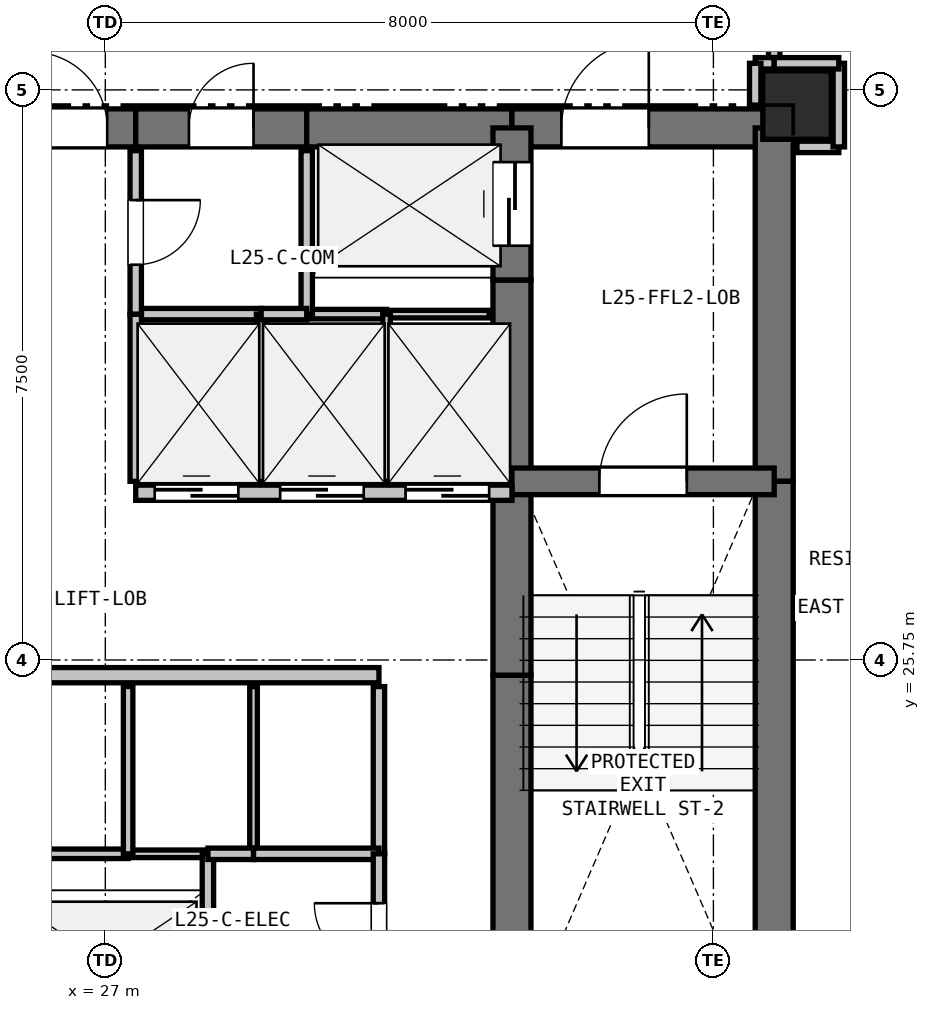
"""IFC4 building model, lengths in metres.
Left out: names, types, materials, properties, quantities, classifications, styles, units other than length and angle.
Written with IfcOpenShell. Run it as: python <this file> out.ifc"""

import sys

from ifc_helpers import new_model, si_unit, direction, frame, frame_2d, origin, origin_2d, place, context, subcontext, project, spatial, rectangle, extrude, element, fill, save


model = new_model("IFC4")
c1 = context("Model", 3, precision=1e-05, world=origin(), true_north=direction((0.0, 1.0)))
c2 = subcontext(c1, "Body", "Model", "MODEL_VIEW")
j1 = project(units=[si_unit("LENGTHUNIT", "METRE"), si_unit("PLANEANGLEUNIT", "RADIAN")], contexts=[c1])
p1 = place(None, origin())
s1 = spatial("IfcSite", under=j1, at=p1, CompositionType="ELEMENT")
p2 = place(p1, origin())
s2 = spatial("IfcBuilding", under=s1, at=p2, CompositionType="ELEMENT")
p3 = place(p2, frame((0.0, 0.0, 93.3)))
s3 = spatial("IfcBuildingStorey", under=s2, at=p3, CompositionType="ELEMENT", Elevation=93.3)
p4 = place(p3, frame((36.1, 33.05, 0.0), z_axis=(0.0, 0.0, 1.0), x_axis=(1.0, 0.0, 0.0)))
e1 = element("IfcColumn", 1, at=p4, inside=s3, PredefinedType="COLUMN", context=c2, shape_type="SweptSolid", body=[
    extrude(rectangle(XDim=0.9, YDim=0.9, at=origin_2d()), origin(), (0.0, 0.0, 1.0), 3.3),
])
p5 = place(p3, frame((25.65, 32.75, 0.0), z_axis=(0.0, 0.0, 1.0), x_axis=(1.0, 0.0, 0.0)))
e2 = element("IfcWall", 2, at=p5, inside=s3, PredefinedType="SHEAR", context=c2, shape_type="SweptSolid", body=[
    extrude(rectangle(XDim=1.75, YDim=0.5, at=frame_2d((0.875, 0.0))), origin(), (0.0, 0.0, 1.0), 3.05),
])
p6 = place(p5, frame((0.375, 0.0, 0.0)))
e3 = element("IfcOpeningElement", 3, at=p6, cuts=e2, PredefinedType="OPENING", context=c2, shape_type="SweptSolid", body=[
    extrude(rectangle(XDim=1.0, YDim=2.15, at=frame_2d((0.5, 1.075))), frame((0.0, 0.26, 0.0), z_axis=(0.0, -1.0, 0.0), x_axis=(1.0, 0.0, 0.0)), (0.0, 0.0, 1.0), 0.52),
])
p7 = place(p3, frame((27.4, 32.75, 0.0), z_axis=(0.0, 0.0, 1.0), x_axis=(1.0, 0.0, 0.0)))
e4 = element("IfcWall", 4, at=p7, inside=s3, PredefinedType="SHEAR", context=c2, shape_type="SweptSolid", body=[
    extrude(rectangle(XDim=2.25, YDim=0.5, at=frame_2d((1.125, 0.0))), origin(), (0.0, 0.0, 1.0), 3.05),
])
p8 = place(p7, frame((0.7, 0.0, 0.0)))
e5 = element("IfcOpeningElement", 5, at=p8, cuts=e4, PredefinedType="OPENING", context=c2, shape_type="SweptSolid", body=[
    extrude(rectangle(XDim=0.85, YDim=2.1, at=frame_2d((0.425, 1.05))), frame((0.0, 0.26, 0.0), z_axis=(0.0, -1.0, 0.0), x_axis=(1.0, 0.0, 0.0)), (0.0, 0.0, 1.0), 0.52),
])
p9 = place(p3, frame((29.65, 32.75, 0.0), z_axis=(0.0, 0.0, 1.0), x_axis=(1.0, 0.0, 0.0)))
e6 = element("IfcWall", 6, at=p9, inside=s3, PredefinedType="SHEAR", context=c2, shape_type="SweptSolid", body=[
    extrude(rectangle(XDim=2.7, YDim=0.5, at=frame_2d((1.35, 0.0))), origin(), (0.0, 0.0, 1.0), 3.05),
])
p10 = place(p3, frame((32.35, 32.75, 0.0), z_axis=(0.0, 0.0, 1.0), x_axis=(1.0, 0.0, 0.0)))
e7 = element("IfcWall", 7, at=p10, inside=s3, PredefinedType="SHEAR", context=c2, shape_type="SweptSolid", body=[
    extrude(rectangle(XDim=3.45, YDim=0.5, at=frame_2d((1.725, 0.0))), origin(), (0.0, 0.0, 1.0), 3.05),
])
p11 = place(p10, frame((0.65, 0.0, 0.0)))
e8 = element("IfcOpeningElement", 8, at=p11, cuts=e7, PredefinedType="OPENING", context=c2, shape_type="SweptSolid", body=[
    extrude(rectangle(XDim=1.15, YDim=2.15, at=frame_2d((0.575, 1.075))), frame((0.0, 0.26, 0.0), z_axis=(0.0, -1.0, 0.0), x_axis=(1.0, 0.0, 0.0)), (0.0, 0.0, 1.0), 0.52),
])
p12 = place(p3, frame((35.8, 32.75, 0.0), z_axis=(0.0, 0.0, 1.0), x_axis=(0.0, -1.0, 0.0)))
e9 = element("IfcWall", 9, at=p12, inside=s3, PredefinedType="SHEAR", context=c2, shape_type="SweptSolid", body=[
    extrude(rectangle(XDim=4.65, YDim=0.5, at=frame_2d((2.325, 0.0))), origin(), (0.0, 0.0, 1.0), 3.05),
])
p13 = place(p3, frame((35.8, 28.1, 0.0), z_axis=(0.0, 0.0, 1.0), x_axis=(0.0, -1.0, 0.0)))
e10 = element("IfcWall", 10, at=p13, inside=s3, PredefinedType="SHEAR", context=c2, shape_type="SweptSolid", body=[
    extrude(rectangle(XDim=7.35, YDim=0.5, at=frame_2d((3.675, 0.0))), origin(), (0.0, 0.0, 1.0), 3.05),
])
p14 = place(p3, frame((32.35, 20.75, 0.0), z_axis=(0.0, 0.0, 1.0), x_axis=(0.0, 1.0, 0.0)))
e11 = element("IfcWall", 11, at=p14, inside=s3, PredefinedType="SHEAR", context=c2, shape_type="SweptSolid", body=[
    extrude(rectangle(XDim=4.8, YDim=0.5, at=frame_2d((2.4, 0.0))), origin(), (0.0, 0.0, 1.0), 3.05),
])
p15 = place(p3, frame((32.35, 25.55, 0.0), z_axis=(0.0, 0.0, 1.0), x_axis=(0.0, 1.0, 0.0)))
e12 = element("IfcWall", 12, at=p15, inside=s3, PredefinedType="SHEAR", context=c2, shape_type="SweptSolid", body=[
    extrude(rectangle(XDim=2.4, YDim=0.5, at=frame_2d((1.2, 0.0))), origin(), (0.0, 0.0, 1.0), 3.05),
])
p16 = place(p3, frame((32.35, 27.95, 0.0), z_axis=(0.0, 0.0, 1.0), x_axis=(0.0, 1.0, 0.0)))
e13 = element("IfcWall", 13, at=p16, inside=s3, PredefinedType="SHEAR", context=c2, shape_type="SweptSolid", body=[
    extrude(rectangle(XDim=2.8, YDim=0.5, at=frame_2d((1.4, 0.0))), origin(), (0.0, 0.0, 1.0), 3.05),
])
p17 = place(p3, frame((32.35, 30.75, 0.0), z_axis=(0.0, 0.0, 1.0), x_axis=(0.0, 1.0, 0.0)))
e14 = element("IfcWall", 14, at=p17, inside=s3, PredefinedType="SHEAR", context=c2, shape_type="SweptSolid", body=[
    extrude(rectangle(XDim=2.0, YDim=0.5, at=frame_2d((1.0, 0.0))), origin(), (0.0, 0.0, 1.0), 3.05),
])
p18 = place(p17, frame((0.45, 0.0, 0.0)))
e15 = element("IfcOpeningElement", 15, at=p18, cuts=e14, PredefinedType="OPENING", context=c2, shape_type="SweptSolid", body=[
    extrude(rectangle(XDim=1.1, YDim=2.15, at=frame_2d((0.55, 1.075))), frame((0.0, 0.26, 0.0), z_axis=(0.0, -1.0, 0.0), x_axis=(1.0, 0.0, 0.0)), (0.0, 0.0, 1.0), 0.52),
])
p19 = place(p3, frame((32.35, 28.1, 0.0), z_axis=(0.0, 0.0, 1.0), x_axis=(1.0, 0.0, 0.0)))
e16 = element("IfcWall", 16, at=p19, inside=s3, PredefinedType="SHEAR", context=c2, shape_type="SweptSolid", body=[
    extrude(rectangle(XDim=3.45, YDim=0.35, at=frame_2d((1.725, 0.0))), origin(), (0.0, 0.0, 1.0), 3.05),
])
p20 = place(p19, frame((1.15, 0.0, 0.0)))
e17 = element("IfcOpeningElement", 17, at=p20, cuts=e16, PredefinedType="OPENING", context=c2, shape_type="SweptSolid", body=[
    extrude(rectangle(XDim=1.15, YDim=2.15, at=frame_2d((0.575, 1.075))), frame((0.0, 0.185, 0.0), z_axis=(0.0, -1.0, 0.0), x_axis=(1.0, 0.0, 0.0)), (0.0, 0.0, 1.0), 0.37),
])
p21 = place(p3, frame((25.65, 25.55, 0.0), z_axis=(0.0, 0.0, 1.0), x_axis=(1.0, 0.0, 0.0)))
e18 = element("IfcWall", 18, at=p21, inside=s3, PredefinedType="PARTITIONING", context=c2, shape_type="SweptSolid", body=[
    extrude(rectangle(XDim=4.95, YDim=0.2, at=frame_2d((2.475, 0.0))), origin(), (0.0, 0.0, 1.0), 3.05),
])
p22 = place(p3, frame((27.4, 27.95, 0.0), z_axis=(0.0, 0.0, 1.0), x_axis=(1.0, 0.0, 0.0)))
e19 = element("IfcWall", 19, at=p22, inside=s3, PredefinedType="PARTITIONING", context=c2, shape_type="SweptSolid", body=[
    extrude(rectangle(XDim=4.95, YDim=0.2, at=frame_2d((2.475, 0.0))), origin(), (0.0, 0.0, 1.0), 3.05),
])
p23 = place(p22, frame((0.25, 0.0, 0.0)))
e20 = element("IfcOpeningElement", 20, at=p23, cuts=e19, PredefinedType="OPENING", context=c2, shape_type="SweptSolid", body=[
    extrude(rectangle(XDim=1.1, YDim=2.15, at=frame_2d((0.55, 1.075))), frame((0.0, 0.11, 0.0), z_axis=(0.0, -1.0, 0.0), x_axis=(1.0, 0.0, 0.0)), (0.0, 0.0, 1.0), 0.22),
])
p24 = place(p22, frame((1.9, 0.0, 0.0)))
e21 = element("IfcOpeningElement", 21, at=p24, cuts=e19, PredefinedType="OPENING", context=c2, shape_type="SweptSolid", body=[
    extrude(rectangle(XDim=1.1, YDim=2.15, at=frame_2d((0.55, 1.075))), frame((0.0, 0.11, 0.0), z_axis=(0.0, -1.0, 0.0), x_axis=(1.0, 0.0, 0.0)), (0.0, 0.0, 1.0), 0.22),
])
p25 = place(p22, frame((3.55, 0.0, 0.0)))
e22 = element("IfcOpeningElement", 22, at=p25, cuts=e19, PredefinedType="OPENING", context=c2, shape_type="SweptSolid", body=[
    extrude(rectangle(XDim=1.1, YDim=2.15, at=frame_2d((0.55, 1.075))), frame((0.0, 0.11, 0.0), z_axis=(0.0, -1.0, 0.0), x_axis=(1.0, 0.0, 0.0)), (0.0, 0.0, 1.0), 0.22),
])
p26 = place(p3, frame((25.95, 23.2, 0.0), z_axis=(0.0, 0.0, 1.0), x_axis=(1.0, 0.0, 0.0)))
e23 = element("IfcWall", 23, at=p26, inside=s3, PredefinedType="PARTITIONING", context=c2, shape_type="SweptSolid", body=[
    extrude(rectangle(XDim=1.35, YDim=0.125, at=frame_2d((0.675, 0.0))), origin(), (0.0, 0.0, 1.0), 3.05),
])
p27 = place(p3, frame((27.3, 23.2, 0.0), z_axis=(0.0, 0.0, 1.0), x_axis=(1.0, 0.0, 0.0)))
e24 = element("IfcWall", 24, at=p27, inside=s3, PredefinedType="PARTITIONING", context=c2, shape_type="SweptSolid", body=[
    extrude(rectangle(XDim=1.05, YDim=0.1, at=frame_2d((0.525, 0.0))), origin(), (0.0, 0.0, 1.0), 3.05),
])
p28 = place(p3, frame((28.35, 23.2, 0.0), z_axis=(0.0, 0.0, 1.0), x_axis=(0.0, -1.0, 0.0)))
e25 = element("IfcWall", 25, at=p28, inside=s3, PredefinedType="PARTITIONING", context=c2, shape_type="SweptSolid", body=[
    extrude(rectangle(XDim=2.15, YDim=0.15, at=frame_2d((1.075, 0.0))), origin(), (0.0, 0.0, 1.0), 3.05),
])
p29 = place(p3, frame((32.05, 30.3, 0.0), z_axis=(0.0, 0.0, 1.0), x_axis=(-1.0, 0.0, 0.0)))
e26 = element("IfcWall", 26, at=p29, inside=s3, PredefinedType="PARTITIONING", context=c2, shape_type="SweptSolid", body=[
    extrude(rectangle(XDim=1.35, YDim=0.1, at=frame_2d((0.675, 0.0))), origin(), (0.0, 0.0, 1.0), 3.05),
])
p30 = place(p3, frame((30.7, 30.3, 0.0), z_axis=(0.0, 0.0, 1.0), x_axis=(-1.0, 0.0, 0.0)))
e27 = element("IfcWall", 27, at=p30, inside=s3, PredefinedType="PARTITIONING", context=c2, shape_type="SweptSolid", body=[
    extrude(rectangle(XDim=1.05, YDim=0.125, at=frame_2d((0.525, 0.0))), origin(), (0.0, 0.0, 1.0), 3.05),
])
p31 = place(p3, frame((29.65, 30.3, 0.0), z_axis=(0.0, 0.0, 1.0), x_axis=(0.0, 1.0, 0.0)))
e28 = element("IfcWall", 28, at=p31, inside=s3, PredefinedType="PARTITIONING", context=c2, shape_type="SweptSolid", body=[
    extrude(rectangle(XDim=2.15, YDim=0.15, at=frame_2d((1.075, 0.0))), origin(), (0.0, 0.0, 1.0), 3.05),
])
p32 = place(p3, frame((27.3, 25.4, 0.0), z_axis=(0.0, 0.0, 1.0), x_axis=(0.0, -1.0, 0.0)))
e29 = element("IfcWall", 29, at=p32, inside=s3, PredefinedType="PARTITIONING", context=c2, shape_type="SweptSolid", body=[
    extrude(rectangle(XDim=2.2, YDim=0.125, at=frame_2d((1.1, 0.0))), origin(), (0.0, 0.0, 1.0), 3.05),
])
p33 = place(p3, frame((28.95, 25.4, 0.0), z_axis=(0.0, 0.0, 1.0), x_axis=(0.0, -1.0, 0.0)))
e30 = element("IfcWall", 30, at=p33, inside=s3, PredefinedType="PARTITIONING", context=c2, shape_type="SweptSolid", body=[
    extrude(rectangle(XDim=2.2, YDim=0.1, at=frame_2d((1.1, 0.0))), origin(), (0.0, 0.0, 1.0), 3.05),
])
p34 = place(p3, frame((28.95, 23.2, 0.0), z_axis=(0.0, 0.0, 1.0), x_axis=(-1.0, 0.0, 0.0)))
e31 = element("IfcWall", 31, at=p34, inside=s3, PredefinedType="PARTITIONING", context=c2, shape_type="SweptSolid", body=[
    extrude(rectangle(XDim=0.6, YDim=0.15, at=frame_2d((0.3, 0.0))), origin(), (0.0, 0.0, 1.0), 3.05),
])
p35 = place(p3, frame((30.6, 25.4, 0.0), z_axis=(0.0, 0.0, 1.0), x_axis=(0.0, -1.0, 0.0)))
e32 = element("IfcWall", 32, at=p35, inside=s3, PredefinedType="PARTITIONING", context=c2, shape_type="SweptSolid", body=[
    extrude(rectangle(XDim=2.2, YDim=0.15, at=frame_2d((1.1, 0.0))), origin(), (0.0, 0.0, 1.0), 3.05),
])
for number, where, z_axis, x_axis in (
    (33, (30.6, 23.2, 0.0), (0.0, 0.0, 1.0), (-1.0, 0.0, 0.0)),
    (34, (27.4, 30.3, 0.0), (0.0, 0.0, 1.0), (1.0, 0.0, 0.0)),
):
    element("IfcWall", number, at=place(p3, frame(where, z_axis=z_axis, x_axis=x_axis)), inside=s3, PredefinedType="PARTITIONING", context=c2, shape_type="SweptSolid", body=[
        extrude(rectangle(XDim=1.65, YDim=0.15, at=frame_2d((0.825, 0.0))), origin(), (0.0, 0.0, 1.0), 3.05),
    ])
p36 = place(p3, frame((29.05, 30.3, 0.0), z_axis=(0.0, 0.0, 1.0), x_axis=(0.0, -1.0, 0.0)))
e35 = element("IfcWall", 35, at=p36, inside=s3, PredefinedType="PARTITIONING", context=c2, shape_type="SweptSolid", body=[
    extrude(rectangle(XDim=2.2, YDim=0.125, at=frame_2d((1.1, 0.0))), origin(), (0.0, 0.0, 1.0), 3.05),
])
p37 = place(p3, frame((27.4, 28.1, 0.0), z_axis=(0.0, 0.0, 1.0), x_axis=(0.0, 1.0, 0.0)))
e36 = element("IfcWall", 36, at=p37, inside=s3, PredefinedType="PARTITIONING", context=c2, shape_type="SweptSolid", body=[
    extrude(rectangle(XDim=2.2, YDim=0.15, at=frame_2d((1.1, 0.0))), origin(), (0.0, 0.0, 1.0), 3.05),
])
p38 = place(p3, frame((29.05, 30.3, 0.0), z_axis=(0.0, 0.0, 1.0), x_axis=(1.0, 0.0, 0.0)))
e37 = element("IfcWall", 37, at=p38, inside=s3, PredefinedType="PARTITIONING", context=c2, shape_type="SweptSolid", body=[
    extrude(rectangle(XDim=0.6, YDim=0.15, at=frame_2d((0.3, 0.0))), origin(), (0.0, 0.0, 1.0), 3.05),
])
p39 = place(p3, frame((30.7, 30.3, 0.0), z_axis=(0.0, 0.0, 1.0), x_axis=(0.0, -1.0, 0.0)))
e38 = element("IfcWall", 38, at=p39, inside=s3, PredefinedType="PARTITIONING", context=c2, shape_type="SweptSolid", body=[
    extrude(rectangle(XDim=2.2, YDim=0.1, at=frame_2d((1.1, 0.0))), origin(), (0.0, 0.0, 1.0), 3.05),
])
p40 = place(p3, frame((30.6, 21.05, 0.0), z_axis=(0.0, 0.0, 1.0), x_axis=(0.0, 1.0, 0.0)))
e39 = element("IfcWall", 39, at=p40, inside=s3, PredefinedType="PARTITIONING", context=c2, shape_type="SweptSolid", body=[
    extrude(rectangle(XDim=2.15, YDim=0.15, at=frame_2d((1.075, 0.0))), origin(), (0.0, 0.0, 1.0), 3.05),
])
p41 = place(p40, frame((0.65, 0.0, 0.0)))
e40 = element("IfcOpeningElement", 40, at=p41, cuts=e39, PredefinedType="OPENING", context=c2, shape_type="SweptSolid", body=[
    extrude(rectangle(XDim=0.85, YDim=2.1, at=frame_2d((0.425, 1.05))), frame((0.0, 0.085, 0.0), z_axis=(0.0, -1.0, 0.0), x_axis=(1.0, 0.0, 0.0)), (0.0, 0.0, 1.0), 0.17),
])
p42 = place(p3, frame((27.4, 32.45, 0.0), z_axis=(0.0, 0.0, 1.0), x_axis=(0.0, -1.0, 0.0)))
e41 = element("IfcWall", 41, at=p42, inside=s3, PredefinedType="PARTITIONING", context=c2, shape_type="SweptSolid", body=[
    extrude(rectangle(XDim=2.15, YDim=0.15, at=frame_2d((1.075, 0.0))), origin(), (0.0, 0.0, 1.0), 3.05),
])
p43 = place(p42, frame((0.65, 0.0, 0.0)))
e42 = element("IfcOpeningElement", 42, at=p43, cuts=e41, PredefinedType="OPENING", context=c2, shape_type="SweptSolid", body=[
    extrude(rectangle(XDim=0.85, YDim=2.1, at=frame_2d((0.425, 1.05))), frame((0.0, 0.085, 0.0), z_axis=(0.0, -1.0, 0.0), x_axis=(1.0, 0.0, 0.0)), (0.0, 0.0, 1.0), 0.17),
])
p44 = place(p3, frame((35.8, 35.35, 0.0), z_axis=(0.0, 0.0, 1.0), x_axis=(0.0, -1.0, 0.0)))
e43 = element("IfcWall", 43, at=p44, inside=s3, PredefinedType="PARTITIONING", context=c2, shape_type="SweptSolid", body=[
    extrude(rectangle(XDim=1.75, YDim=0.15, at=frame_2d((0.875, 0.0))), origin(), (0.0, 0.0, 1.0), 3.05),
])
p45 = place(p44, frame((0.375, 0.0, 0.0)))
e44 = element("IfcOpeningElement", 44, at=p45, cuts=e43, PredefinedType="OPENING", context=c2, shape_type="SweptSolid", body=[
    extrude(rectangle(XDim=1.0, YDim=2.15, at=frame_2d((0.5, 1.075))), frame((0.0, 0.085, 0.0), z_axis=(0.0, -1.0, 0.0), x_axis=(1.0, 0.0, 0.0)), (0.0, 0.0, 1.0), 0.17),
])
p46 = place(p3, frame((35.8, 33.6, 0.0), z_axis=(0.0, 0.0, 1.0), x_axis=(-1.0, 0.0, 0.0)))
e45 = element("IfcWall", 45, at=p46, inside=s3, PredefinedType="PARTITIONING", context=c2, shape_type="SweptSolid", body=[
    extrude(rectangle(XDim=0.25, YDim=0.15, at=frame_2d((0.125, 0.0))), origin(), (0.0, 0.0, 1.0), 3.05),
])
p47 = place(p3, frame((35.55, 33.6, 0.0), z_axis=(0.0, 0.0, 1.0), x_axis=(0.0, -1.0, 0.0)))
e46 = element("IfcWall", 46, at=p47, inside=s3, PredefinedType="PARTITIONING", context=c2, shape_type="SweptSolid", body=[
    extrude(rectangle(XDim=0.55, YDim=0.15, at=frame_2d((0.275, 0.0))), origin(), (0.0, 0.0, 1.0), 2.498),
])
p48 = place(p3, frame((36.1, 32.5, 0.0), z_axis=(0.0, 0.0, 1.0), x_axis=(1.0, 0.0, 0.0)))
e47 = element("IfcWall", 47, at=p48, inside=s3, PredefinedType="PARTITIONING", context=c2, shape_type="SweptSolid", body=[
    extrude(rectangle(XDim=0.55, YDim=0.15, at=frame_2d((0.275, 0.0))), origin(), (0.0, 0.0, 1.0), 2.498),
])
p49 = place(p3, frame((36.65, 32.5, 0.0), z_axis=(0.0, 0.0, 1.0), x_axis=(0.0, 1.0, 0.0)))
e48 = element("IfcWall", 48, at=p49, inside=s3, PredefinedType="PARTITIONING", context=c2, shape_type="SweptSolid", body=[
    extrude(rectangle(XDim=1.1, YDim=0.15, at=frame_2d((0.55, 0.0))), origin(), (0.0, 0.0, 1.0), 2.423),
])
p50 = place(p3, frame((36.65, 33.6, 0.0), z_axis=(0.0, 0.0, 1.0), x_axis=(-1.0, 0.0, 0.0)))
e49 = element("IfcWall", 49, at=p50, inside=s3, PredefinedType="PARTITIONING", context=c2, shape_type="SweptSolid", body=[
    extrude(rectangle(XDim=0.85, YDim=0.15, at=frame_2d((0.425, 0.0))), origin(), (0.0, 0.0, 1.0), 2.423),
])
p51 = place(p23, origin())
e50 = element("IfcDoor", 50, at=p51, inside=s3, OperationType="SLIDING_TO_LEFT", PredefinedType="DOOR", context=c2, shape_type="SweptSolid", body=[
    extrude(rectangle(XDim=1.1, YDim=2.15, at=frame_2d((0.55, 1.075))), frame((0.0, 0.025, 0.0), z_axis=(0.0, -1.0, 0.0), x_axis=(1.0, 0.0, 0.0)), (0.0, 0.0, 1.0), 0.05),
])
fill(e20, e50)
p52 = place(p24, origin())
e51 = element("IfcDoor", 51, at=p52, inside=s3, OperationType="SLIDING_TO_LEFT", PredefinedType="DOOR", context=c2, shape_type="SweptSolid", body=[
    extrude(rectangle(XDim=1.1, YDim=2.15, at=frame_2d((0.55, 1.075))), frame((0.0, 0.025, 0.0), z_axis=(0.0, -1.0, 0.0), x_axis=(1.0, 0.0, 0.0)), (0.0, 0.0, 1.0), 0.05),
])
fill(e21, e51)
p53 = place(p25, origin())
e52 = element("IfcDoor", 52, at=p53, inside=s3, OperationType="SLIDING_TO_LEFT", PredefinedType="DOOR", context=c2, shape_type="SweptSolid", body=[
    extrude(rectangle(XDim=1.1, YDim=2.15, at=frame_2d((0.55, 1.075))), frame((0.0, 0.025, 0.0), z_axis=(0.0, -1.0, 0.0), x_axis=(1.0, 0.0, 0.0)), (0.0, 0.0, 1.0), 0.05),
])
fill(e22, e52)
p54 = place(p6, origin())
e53 = element("IfcDoor", 53, at=p54, inside=s3, OperationType="SINGLE_SWING_LEFT", PredefinedType="DOOR", context=c2, shape_type="SweptSolid", body=[
    extrude(rectangle(XDim=1.0, YDim=2.15, at=frame_2d((0.5, 1.075))), frame((0.0, 0.025, 0.0), z_axis=(0.0, -1.0, 0.0), x_axis=(1.0, 0.0, 0.0)), (0.0, 0.0, 1.0), 0.05),
])
fill(e3, e53)
p55 = place(p18, origin())
e54 = element("IfcDoor", 54, at=p55, inside=s3, OperationType="SLIDING_TO_LEFT", PredefinedType="DOOR", context=c2, shape_type="SweptSolid", body=[
    extrude(rectangle(XDim=1.1, YDim=2.15, at=frame_2d((0.55, 1.075))), frame((0.0, 0.025, 0.0), z_axis=(0.0, -1.0, 0.0), x_axis=(1.0, 0.0, 0.0)), (0.0, 0.0, 1.0), 0.05),
])
fill(e15, e54)
p56 = place(p20, origin())
e55 = element("IfcDoor", 55, at=p56, inside=s3, OperationType="SINGLE_SWING_RIGHT", PredefinedType="DOOR", context=c2, shape_type="SweptSolid", body=[
    extrude(rectangle(XDim=1.15, YDim=2.15, at=frame_2d((0.575, 1.075))), frame((0.0, 0.025, 0.0), z_axis=(0.0, -1.0, 0.0), x_axis=(1.0, 0.0, 0.0)), (0.0, 0.0, 1.0), 0.05),
])
fill(e17, e55)
p57 = place(p11, origin())
e56 = element("IfcDoor", 56, at=p57, inside=s3, OperationType="SINGLE_SWING_RIGHT", PredefinedType="DOOR", context=c2, shape_type="SweptSolid", body=[
    extrude(rectangle(XDim=1.15, YDim=2.15, at=frame_2d((0.575, 1.075))), frame((0.0, 0.025, 0.0), z_axis=(0.0, -1.0, 0.0), x_axis=(1.0, 0.0, 0.0)), (0.0, 0.0, 1.0), 0.05),
])
fill(e8, e56)
p58 = place(p41, origin())
e57 = element("IfcDoor", 57, at=p58, inside=s3, OperationType="SINGLE_SWING_RIGHT", PredefinedType="DOOR", context=c2, shape_type="SweptSolid", body=[
    extrude(rectangle(XDim=0.85, YDim=2.1, at=frame_2d((0.425, 1.05))), frame((0.0, 0.025, 0.0), z_axis=(0.0, -1.0, 0.0), x_axis=(1.0, 0.0, 0.0)), (0.0, 0.0, 1.0), 0.05),
])
fill(e40, e57)
p59 = place(p43, origin())
e58 = element("IfcDoor", 58, at=p59, inside=s3, OperationType="SINGLE_SWING_LEFT", PredefinedType="DOOR", context=c2, shape_type="SweptSolid", body=[
    extrude(rectangle(XDim=0.85, YDim=2.1, at=frame_2d((0.425, 1.05))), frame((0.0, 0.025, 0.0), z_axis=(0.0, -1.0, 0.0), x_axis=(1.0, 0.0, 0.0)), (0.0, 0.0, 1.0), 0.05),
])
fill(e42, e58)
p60 = place(p8, origin())
e59 = element("IfcDoor", 59, at=p60, inside=s3, OperationType="SINGLE_SWING_RIGHT", PredefinedType="DOOR", context=c2, shape_type="SweptSolid", body=[
    extrude(rectangle(XDim=0.85, YDim=2.1, at=frame_2d((0.425, 1.05))), frame((0.0, 0.025, 0.0), z_axis=(0.0, -1.0, 0.0), x_axis=(1.0, 0.0, 0.0)), (0.0, 0.0, 1.0), 0.05),
])
fill(e5, e59)
save(model, sys.argv[1])
